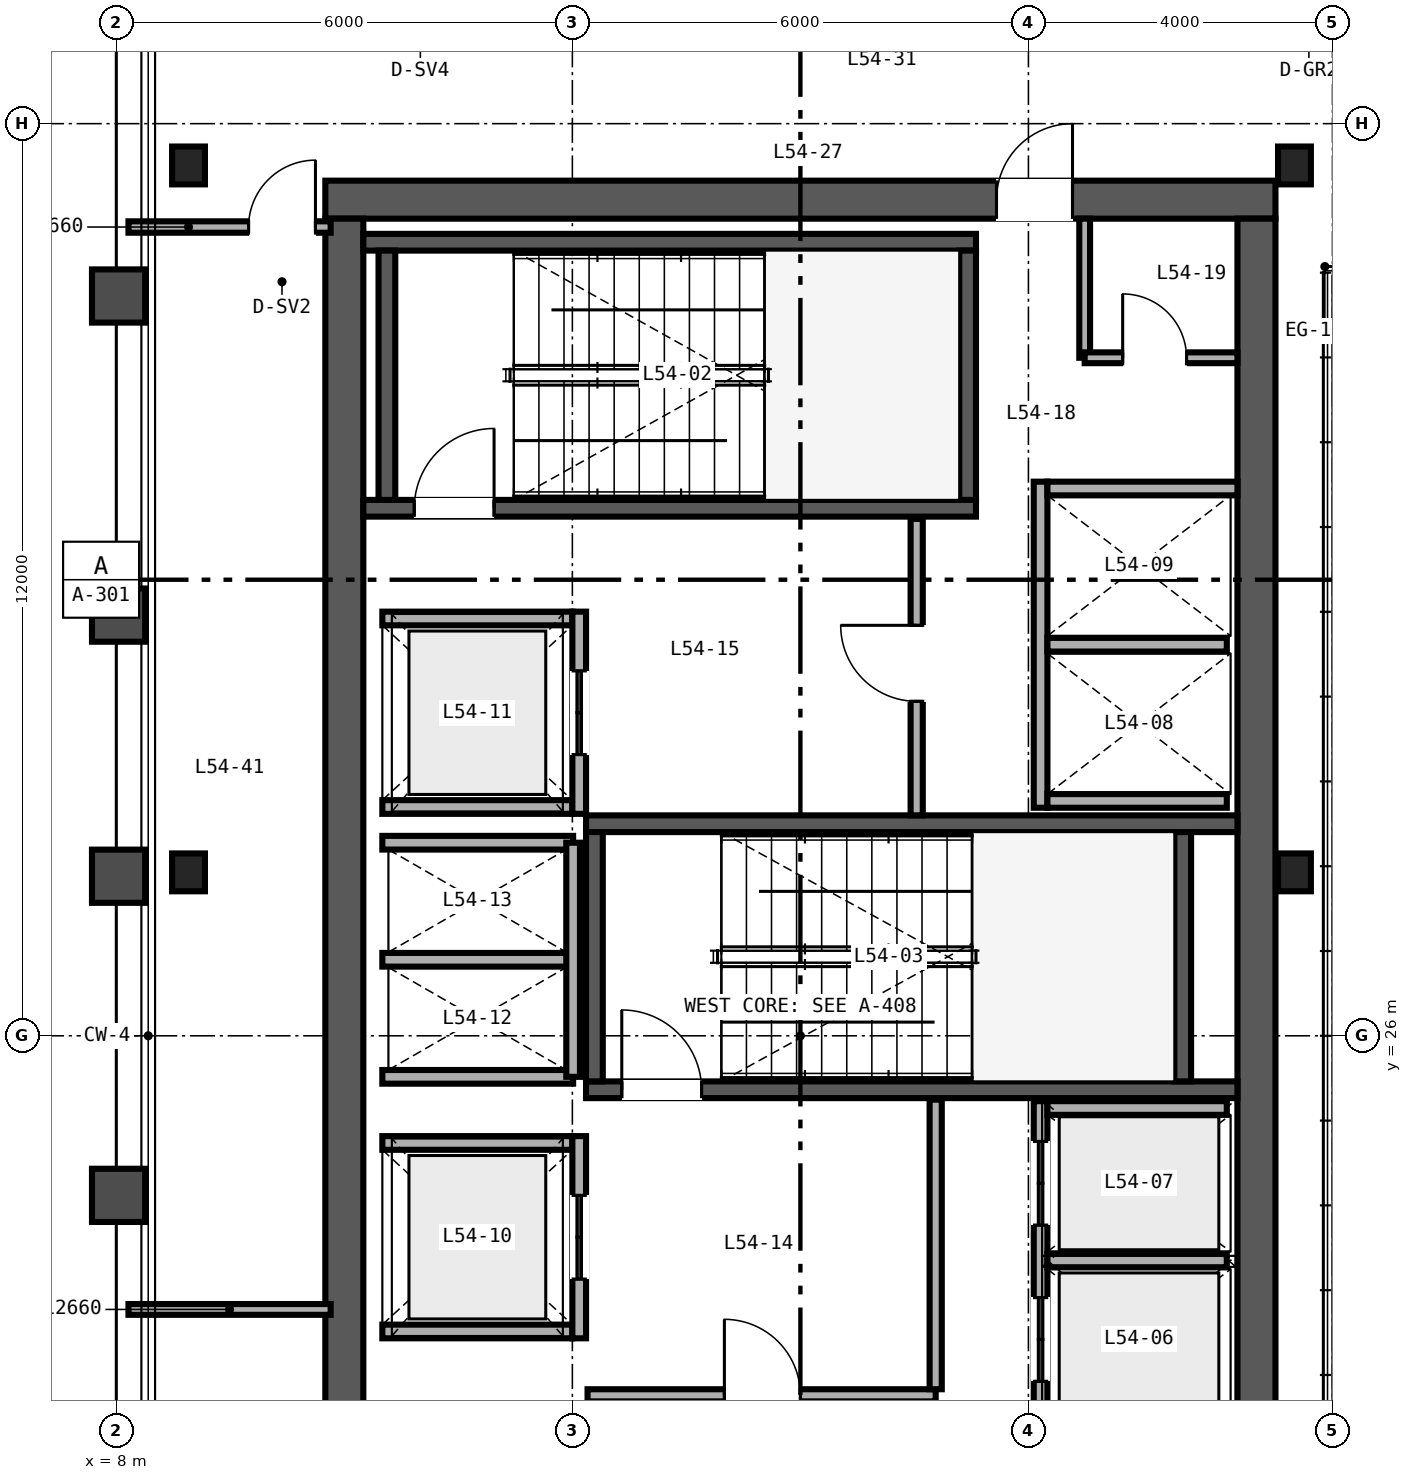
"""IFC4 building model, lengths in metres.
Left out: names, types, materials, properties, quantities, classifications, styles, units other than length and angle.
Written with IfcOpenShell. Run it as: python <this file> out.ifc"""

import sys

from ifc_helpers import new_model, si_unit, direction, frame, frame_2d, origin, origin_2d, place, context, subcontext, project, spatial, rectangle, i_section, extrude, source, transform, mapped, element, fill, save


model = new_model("IFC4")
c1 = context("Model", 3, precision=1e-05, world=origin(), true_north=direction((0.0, 1.0)))
c2 = subcontext(c1, "Body", "Model", "MODEL_VIEW")
j1 = project(units=[si_unit("LENGTHUNIT", "METRE"), si_unit("PLANEANGLEUNIT", "RADIAN")], contexts=[c1])
p1 = place(None, origin())
s1 = spatial("IfcSite", under=j1, at=p1, CompositionType="ELEMENT")
p2 = place(p1, origin())
s2 = spatial("IfcBuilding", under=s1, at=p2, CompositionType="ELEMENT")
p3 = place(p2, frame((0.0, 0.0, 213.6)))
s3 = spatial("IfcBuildingStorey", under=s2, at=p3, CompositionType="ELEMENT", Elevation=213.6)
p4 = place(p3, frame((10.75, 37.0, 0.0), z_axis=(0.0, 0.0, 1.0), x_axis=(1.0, 0.0, 0.0)))
e1 = element("IfcWall", 1, at=p4, inside=s3, PredefinedType="SHEAR", context=c2, shape_type="SweptSolid", body=[
    extrude(rectangle(XDim=12.5, YDim=0.5, at=frame_2d((6.25, 0.0))), origin(), (0.0, 0.0, 1.0), 3.37),
])
p5 = place(p4, frame((8.83, 0.0, 0.0)))
e2 = element("IfcOpeningElement", 2, at=p5, cuts=e1, PredefinedType="OPENING", context=c2, shape_type="SweptSolid", body=[
    extrude(rectangle(XDim=1.0, YDim=2.15, at=frame_2d((0.5, 1.075))), frame((0.0, 0.26, 0.0), z_axis=(0.0, -1.0, 0.0), x_axis=(1.0, 0.0, 0.0)), (0.0, 0.0, 1.0), 0.52),
])
for number, where, z_axis, x_axis in (
    (3, (11.0, 15.25, 0.0), (0.0, 0.0, 1.0), (0.0, 1.0, 0.0)),
    (4, (23.0, 15.25, 0.0), (0.0, 0.0, 1.0), (0.0, 1.0, 0.0)),
):
    element("IfcWall", number, at=place(p3, frame(where, z_axis=z_axis, x_axis=x_axis)), inside=s3, PredefinedType="SHEAR", context=c2, shape_type="SweptSolid", body=[
        extrude(rectangle(XDim=21.5, YDim=0.5, at=frame_2d((10.75, 0.0))), origin(), (0.0, 0.0, 1.0), 3.37),
    ])
p6 = place(p3, frame((11.25, 32.94, 0.0), z_axis=(0.0, 0.0, 1.0), x_axis=(1.0, 0.0, 0.0)))
e5 = element("IfcWall", 5, at=p6, inside=s3, PredefinedType="SHEAR", context=c2, shape_type="SweptSolid", body=[
    extrude(rectangle(XDim=8.06, YDim=0.22, at=frame_2d((4.03, 0.0))), origin(), (0.0, 0.0, 1.0), 3.4),
])
p7 = place(p6, frame((0.67, 0.0, 0.0)))
e6 = element("IfcOpeningElement", 6, at=p7, cuts=e5, PredefinedType="OPENING", context=c2, shape_type="SweptSolid", body=[
    extrude(rectangle(XDim=1.05, YDim=2.15, at=frame_2d((0.525, 1.075))), frame((0.0, 0.12, 0.0), z_axis=(0.0, -1.0, 0.0), x_axis=(1.0, 0.0, 0.0)), (0.0, 0.0, 1.0), 0.24),
])
p8 = place(p3, frame((11.25, 36.44, 0.0), z_axis=(0.0, 0.0, 1.0), x_axis=(1.0, 0.0, 0.0)))
e7 = element("IfcWall", 7, at=p8, inside=s3, PredefinedType="SHEAR", context=c2, shape_type="SweptSolid", body=[
    extrude(rectangle(XDim=8.06, YDim=0.22, at=frame_2d((4.03, 0.0))), origin(), (0.0, 0.0, 1.0), 3.4),
])
for number, where, z_axis, x_axis in (
    (8, (11.56, 33.05, 0.0), (0.0, 0.0, 1.0), (0.0, 1.0, 0.0)),
    (9, (19.2, 33.05, 0.0), (0.0, 0.0, 1.0), (0.0, 1.0, 0.0)),
):
    element("IfcWall", number, at=place(p3, frame(where, z_axis=z_axis, x_axis=x_axis)), inside=s3, PredefinedType="SHEAR", context=c2, shape_type="SweptSolid", body=[
        extrude(rectangle(XDim=3.28, YDim=0.22, at=frame_2d((1.64, 0.0))), origin(), (0.0, 0.0, 1.0), 3.4),
    ])
p9 = place(p3, frame((14.18, 25.29, 0.0), z_axis=(0.0, 0.0, 1.0), x_axis=(1.0, 0.0, 0.0)))
e10 = element("IfcWall", 10, at=p9, inside=s3, PredefinedType="SHEAR", context=c2, shape_type="SweptSolid", body=[
    extrude(rectangle(XDim=8.57, YDim=0.22, at=frame_2d((4.285, 0.0))), origin(), (0.0, 0.0, 1.0), 3.4),
])
p10 = place(p9, frame((0.47, 0.0, 0.0)))
e11 = element("IfcOpeningElement", 11, at=p10, cuts=e10, PredefinedType="OPENING", context=c2, shape_type="SweptSolid", body=[
    extrude(rectangle(XDim=1.05, YDim=2.15, at=frame_2d((0.525, 1.075))), frame((0.0, 0.12, 0.0), z_axis=(0.0, -1.0, 0.0), x_axis=(1.0, 0.0, 0.0)), (0.0, 0.0, 1.0), 0.24),
])
p11 = place(p3, frame((14.18, 28.79, 0.0), z_axis=(0.0, 0.0, 1.0), x_axis=(1.0, 0.0, 0.0)))
e12 = element("IfcWall", 12, at=p11, inside=s3, PredefinedType="SHEAR", context=c2, shape_type="SweptSolid", body=[
    extrude(rectangle(XDim=8.57, YDim=0.22, at=frame_2d((4.285, 0.0))), origin(), (0.0, 0.0, 1.0), 3.4),
])
for number, where, z_axis, x_axis in (
    (13, (14.29, 25.4, 0.0), (0.0, 0.0, 1.0), (0.0, 1.0, 0.0)),
    (14, (22.03, 25.4, 0.0), (0.0, 0.0, 1.0), (0.0, 1.0, 0.0)),
):
    element("IfcWall", number, at=place(p3, frame(where, z_axis=z_axis, x_axis=x_axis)), inside=s3, PredefinedType="SHEAR", context=c2, shape_type="SweptSolid", body=[
        extrude(rectangle(XDim=3.28, YDim=0.22, at=frame_2d((1.64, 0.0))), origin(), (0.0, 0.0, 1.0), 3.4),
    ])
m1 = source(origin(), c2, "Body", "SweptSolid", [
    extrude(i_section(OverallWidth=0.432, OverallDepth=0.498, WebThickness=0.056, FlangeThickness=0.089, FilletRadius=0.025, at=origin_2d()), origin(), (0.0, 0.0, 1.0), 3.37),
])
for number, where, z_axis, x_axis in (
    (15, (8.95, 28.15, 0.0), (0.0, 0.0, 1.0), (1.0, 0.0, 0.0)),
    (16, (23.5, 28.15, 0.0), (0.0, 0.0, 1.0), (1.0, 0.0, 0.0)),
    (17, (8.95, 37.45, 0.0), (0.0, 0.0, 1.0), (1.0, 0.0, 0.0)),
    (18, (23.5, 37.45, 0.0), (0.0, 0.0, 1.0), (1.0, 0.0, 0.0)),
):
    element("IfcColumn", number, at=place(p3, frame(where, z_axis=z_axis, x_axis=x_axis)), inside=s3, PredefinedType="COLUMN", context=c2, shape_type="MappedRepresentation", body=[
        mapped(m1, transform((0.0, 0.0, 0.0), scale=1.0)),
    ])
p12 = place(p3, frame((20.16, 18.82, 0.0), z_axis=(0.0, 0.0, 1.0), x_axis=(0.0, 1.0, 0.0)))
e19 = element("IfcWall", 19, at=p12, inside=s3, PredefinedType="SOLIDWALL", context=c2, shape_type="SweptSolid", body=[
    extrude(rectangle(XDim=6.32, YDim=0.18, at=frame_2d((3.16, 0.0))), origin(), (0.0, 0.0, 1.0), 2.47),
])
p13 = place(p12, frame((0.555, 0.0, 0.0)))
e20 = element("IfcOpeningElement", 20, at=p13, cuts=e19, PredefinedType="OPENING", context=c2, shape_type="SweptSolid", body=[
    extrude(rectangle(XDim=1.1, YDim=2.2, at=frame_2d((0.55, 1.1))), frame((0.0, 0.1, 0.0), z_axis=(0.0, -1.0, 0.0), x_axis=(1.0, 0.0, 0.0)), (0.0, 0.0, 1.0), 0.2),
])
p14 = place(p12, frame((2.635, 0.0, 0.0)))
e21 = element("IfcOpeningElement", 21, at=p14, cuts=e19, PredefinedType="OPENING", context=c2, shape_type="SweptSolid", body=[
    extrude(rectangle(XDim=1.1, YDim=2.2, at=frame_2d((0.55, 1.1))), frame((0.0, 0.1, 0.0), z_axis=(0.0, -1.0, 0.0), x_axis=(1.0, 0.0, 0.0)), (0.0, 0.0, 1.0), 0.2),
])
p15 = place(p12, frame((4.69, 0.0, 0.0)))
e22 = element("IfcOpeningElement", 22, at=p15, cuts=e19, PredefinedType="OPENING", context=c2, shape_type="SweptSolid", body=[
    extrude(rectangle(XDim=1.1, YDim=2.2, at=frame_2d((0.55, 1.1))), frame((0.0, 0.1, 0.0), z_axis=(0.0, -1.0, 0.0), x_axis=(1.0, 0.0, 0.0)), (0.0, 0.0, 1.0), 0.2),
])
for number, where, z_axis, x_axis in (
    (23, (20.25, 25.05, 0.0), (0.0, 0.0, 1.0), (1.0, 0.0, 0.0)),
    (24, (20.25, 23.045, 0.0), (0.0, 0.0, 1.0), (1.0, 0.0, 0.0)),
):
    element("IfcWall", number, at=place(p3, frame(where, z_axis=z_axis, x_axis=x_axis)), inside=s3, PredefinedType="SOLIDWALL", context=c2, shape_type="SweptSolid", body=[
        extrude(rectangle(XDim=2.36, YDim=0.18, at=frame_2d((1.18, 0.0))), origin(), (0.0, 0.0, 1.0), 3.37),
    ])
p16 = place(p3, frame((20.16, 29.0, 0.0), z_axis=(0.0, 0.0, 1.0), x_axis=(0.0, 1.0, 0.0)))
e25 = element("IfcWall", 25, at=p16, inside=s3, PredefinedType="SOLIDWALL", context=c2, shape_type="SweptSolid", body=[
    extrude(rectangle(XDim=4.29, YDim=0.18, at=frame_2d((2.145, 0.0))), origin(), (0.0, 0.0, 1.0), 3.37),
])
p17 = place(p3, frame((20.25, 29.09, 0.0), z_axis=(0.0, 0.0, 1.0), x_axis=(1.0, 0.0, 0.0)))
e26 = element("IfcWall", 26, at=p17, inside=s3, PredefinedType="SOLIDWALL", context=c2, shape_type="SweptSolid", body=[
    extrude(rectangle(XDim=2.36, YDim=0.18, at=frame_2d((1.18, 0.0))), origin(), (0.0, 0.0, 1.0), 3.37),
])
p18 = place(p3, frame((20.25, 33.2, 0.0), z_axis=(0.0, 0.0, 1.0), x_axis=(1.0, 0.0, 0.0)))
e27 = element("IfcWall", 27, at=p18, inside=s3, PredefinedType="SOLIDWALL", context=c2, shape_type="SweptSolid", body=[
    extrude(rectangle(XDim=2.5, YDim=0.18, at=frame_2d((1.25, 0.0))), origin(), (0.0, 0.0, 1.0), 3.37),
])
p19 = place(p3, frame((20.25, 31.145, 0.0), z_axis=(0.0, 0.0, 1.0), x_axis=(1.0, 0.0, 0.0)))
e28 = element("IfcWall", 28, at=p19, inside=s3, PredefinedType="SOLIDWALL", context=c2, shape_type="SweptSolid", body=[
    extrude(rectangle(XDim=2.36, YDim=0.18, at=frame_2d((1.18, 0.0))), origin(), (0.0, 0.0, 1.0), 3.37),
])
for number, where, z_axis, x_axis in (
    (29, (11.5, 22.11, 0.0), (0.0, 0.0, 1.0), (1.0, 0.0, 0.0)),
    (30, (11.5, 24.59, 0.0), (0.0, 0.0, 1.0), (1.0, 0.0, 0.0)),
):
    element("IfcWall", number, at=place(p3, frame(where, z_axis=z_axis, x_axis=x_axis)), inside=s3, PredefinedType="SOLIDWALL", context=c2, shape_type="SweptSolid", body=[
        extrude(rectangle(XDim=2.5, YDim=0.18, at=frame_2d((1.25, 0.0))), origin(), (0.0, 0.0, 1.0), 3.37),
    ])
p20 = place(p3, frame((14.09, 22.02, 0.0), z_axis=(0.0, 0.0, 1.0), x_axis=(0.0, 1.0, 0.0)))
e31 = element("IfcWall", 31, at=p20, inside=s3, PredefinedType="SOLIDWALL", context=c2, shape_type="SweptSolid", body=[
    extrude(rectangle(XDim=2.66, YDim=0.18, at=frame_2d((1.33, 0.0))), origin(), (0.0, 0.0, 1.0), 3.37),
])
p21 = place(p20, frame((0.78, 0.0, 0.0)))
e32 = element("IfcOpeningElement", 32, at=p21, cuts=e31, PredefinedType="OPENING", context=c2, shape_type="SweptSolid", body=[
    extrude(rectangle(XDim=1.1, YDim=2.2, at=frame_2d((0.55, 1.1))), frame((0.0, 0.1, 0.0), z_axis=(0.0, -1.0, 0.0), x_axis=(1.0, 0.0, 0.0)), (0.0, 0.0, 1.0), 0.2),
])
for number, where, z_axis, x_axis in (
    (33, (11.5, 29.01, 0.0), (0.0, 0.0, 1.0), (1.0, 0.0, 0.0)),
    (34, (11.5, 31.49, 0.0), (0.0, 0.0, 1.0), (1.0, 0.0, 0.0)),
):
    element("IfcWall", number, at=place(p3, frame(where, z_axis=z_axis, x_axis=x_axis)), inside=s3, PredefinedType="SOLIDWALL", context=c2, shape_type="SweptSolid", body=[
        extrude(rectangle(XDim=2.5, YDim=0.18, at=frame_2d((1.25, 0.0))), origin(), (0.0, 0.0, 1.0), 3.37),
    ])
p22 = place(p3, frame((14.09, 28.92, 0.0), z_axis=(0.0, 0.0, 1.0), x_axis=(0.0, 1.0, 0.0)))
e35 = element("IfcWall", 35, at=p22, inside=s3, PredefinedType="SOLIDWALL", context=c2, shape_type="SweptSolid", body=[
    extrude(rectangle(XDim=2.66, YDim=0.18, at=frame_2d((1.33, 0.0))), origin(), (0.0, 0.0, 1.0), 3.37),
])
p23 = place(p22, frame((0.78, 0.0, 0.0)))
e36 = element("IfcOpeningElement", 36, at=p23, cuts=e35, PredefinedType="OPENING", context=c2, shape_type="SweptSolid", body=[
    extrude(rectangle(XDim=1.1, YDim=2.2, at=frame_2d((0.55, 1.1))), frame((0.0, 0.1, 0.0), z_axis=(0.0, -1.0, 0.0), x_axis=(1.0, 0.0, 0.0)), (0.0, 0.0, 1.0), 0.2),
])
for number, where, z_axis, x_axis in (
    (37, (11.5, 25.46, 0.0), (0.0, 0.0, 1.0), (1.0, 0.0, 0.0)),
    (38, (11.5, 27.0, 0.0), (0.0, 0.0, 1.0), (1.0, 0.0, 0.0)),
    (39, (11.5, 28.54, 0.0), (0.0, 0.0, 1.0), (1.0, 0.0, 0.0)),
):
    element("IfcWall", number, at=place(p3, frame(where, z_axis=z_axis, x_axis=x_axis)), inside=s3, PredefinedType="SOLIDWALL", context=c2, shape_type="SweptSolid", body=[
        extrude(rectangle(XDim=2.51, YDim=0.18, at=frame_2d((1.255, 0.0))), origin(), (0.0, 0.0, 1.0), 3.37),
    ])
p24 = place(p3, frame((14.01, 25.46, 0.0), z_axis=(0.0, 0.0, 1.0), x_axis=(0.0, 1.0, 0.0)))
e40 = element("IfcWall", 40, at=p24, inside=s3, PredefinedType="SOLIDWALL", context=c2, shape_type="SweptSolid", body=[
    extrude(rectangle(XDim=3.08, YDim=0.18, at=frame_2d((1.54, 0.0))), origin(), (0.0, 0.0, 1.0), 3.37),
])
p25 = place(p3, frame((14.2, 21.27, 0.0), z_axis=(0.0, 0.0, 1.0), x_axis=(1.0, 0.0, 0.0)))
e41 = element("IfcWall", 41, at=p25, inside=s3, PredefinedType="PARTITIONING", context=c2, shape_type="SweptSolid", body=[
    extrude(rectangle(XDim=4.58, YDim=0.16, at=frame_2d((2.29, 0.0))), origin(), (0.0, 0.0, 1.0), 3.37),
])
p26 = place(p25, frame((1.8, 0.0, 0.0)))
e42 = element("IfcOpeningElement", 42, at=p26, cuts=e41, PredefinedType="OPENING", context=c2, shape_type="SweptSolid", body=[
    extrude(rectangle(XDim=1.0, YDim=2.15, at=frame_2d((0.5, 1.075))), frame((0.0, 0.09, 0.0), z_axis=(0.0, -1.0, 0.0), x_axis=(1.0, 0.0, 0.0)), (0.0, 0.0, 1.0), 0.18),
])
p27 = place(p3, frame((18.78, 21.35, 0.0), z_axis=(0.0, 0.0, 1.0), x_axis=(0.0, 1.0, 0.0)))
e43 = element("IfcWall", 43, at=p27, inside=s3, PredefinedType="PARTITIONING", context=c2, shape_type="SweptSolid", body=[
    extrude(rectangle(XDim=3.81, YDim=0.16, at=frame_2d((1.905, 0.0))), origin(), (0.0, 0.0, 1.0), 3.37),
])
p28 = place(p3, frame((18.53, 28.9, 0.0), z_axis=(0.0, 0.0, 1.0), x_axis=(0.0, 1.0, 0.0)))
e44 = element("IfcWall", 44, at=p28, inside=s3, PredefinedType="PARTITIONING", context=c2, shape_type="SweptSolid", body=[
    extrude(rectangle(XDim=3.9, YDim=0.16, at=frame_2d((1.95, 0.0))), origin(), (0.0, 0.0, 1.0), 3.37),
])
p29 = place(p28, frame((1.5, 0.0, 0.0)))
e45 = element("IfcOpeningElement", 45, at=p29, cuts=e44, PredefinedType="OPENING", context=c2, shape_type="SweptSolid", body=[
    extrude(rectangle(XDim=1.0, YDim=2.15, at=frame_2d((0.5, 1.075))), frame((0.0, 0.09, 0.0), z_axis=(0.0, -1.0, 0.0), x_axis=(1.0, 0.0, 0.0)), (0.0, 0.0, 1.0), 0.18),
])
p30 = place(p3, frame((20.74, 34.92, 0.0), z_axis=(0.0, 0.0, 1.0), x_axis=(0.0, 1.0, 0.0)))
e46 = element("IfcWall", 46, at=p30, inside=s3, PredefinedType="PARTITIONING", context=c2, shape_type="SweptSolid", body=[
    extrude(rectangle(XDim=1.83, YDim=0.142, at=frame_2d((0.915, 0.0))), origin(), (0.0, 0.0, 1.0), 3.37),
])
p31 = place(p3, frame((20.74, 34.92, 0.0), z_axis=(0.0, 0.0, 1.0), x_axis=(1.0, 0.0, 0.0)))
e47 = element("IfcWall", 47, at=p31, inside=s3, PredefinedType="PARTITIONING", context=c2, shape_type="SweptSolid", body=[
    extrude(rectangle(XDim=2.01, YDim=0.142, at=frame_2d((1.005, 0.0))), origin(), (0.0, 0.0, 1.0), 3.37),
])
p32 = place(p31, frame((0.5, 0.0, 0.0)))
e48 = element("IfcOpeningElement", 48, at=p32, cuts=e47, PredefinedType="OPENING", context=c2, shape_type="SweptSolid", body=[
    extrude(rectangle(XDim=0.84, YDim=2.1, at=frame_2d((0.42, 1.05))), frame((0.0, 0.081, 0.0), z_axis=(0.0, -1.0, 0.0), x_axis=(1.0, 0.0, 0.0)), (0.0, 0.0, 1.0), 0.162),
])
p33 = place(p3, frame((8.16, 36.64, 0.0), z_axis=(0.0, 0.0, 1.0), x_axis=(1.0, 0.0, 0.0)))
e49 = element("IfcWall", 49, at=p33, inside=s3, PredefinedType="PARTITIONING", context=c2, shape_type="SweptSolid", body=[
    extrude(rectangle(XDim=2.66, YDim=0.15, at=frame_2d((1.33, 0.0))), origin(), (0.0, 0.0, 1.0), 2.753),
])
p34 = place(p33, frame((1.58, 0.0, 0.0)))
e50 = element("IfcOpeningElement", 50, at=p34, cuts=e49, PredefinedType="OPENING", context=c2, shape_type="SweptSolid", body=[
    extrude(rectangle(XDim=0.88, YDim=2.15, at=frame_2d((0.44, 1.075))), frame((0.0, 0.085, 0.0), z_axis=(0.0, -1.0, 0.0), x_axis=(1.0, 0.0, 0.0)), (0.0, 0.0, 1.0), 0.17),
])
p35 = place(p3, frame((8.16, 22.4, 0.0), z_axis=(0.0, 0.0, 1.0), x_axis=(1.0, 0.0, 0.0)))
e51 = element("IfcWall", 51, at=p35, inside=s3, PredefinedType="PARTITIONING", context=c2, shape_type="SweptSolid", body=[
    extrude(rectangle(XDim=2.66, YDim=0.142, at=frame_2d((1.33, 0.0))), origin(), (0.0, 0.0, 1.0), 2.591),
])
m2 = source(origin(), c2, "Body", "SweptSolid", [
    extrude(rectangle(XDim=1.05, YDim=2.15, at=frame_2d((0.525, 1.075))), frame((0.0, 0.025, 0.0), z_axis=(0.0, -1.0, 0.0), x_axis=(1.0, 0.0, 0.0)), (0.0, 0.0, 1.0), 0.05),
])
p36 = place(p7, origin())
e52 = element("IfcDoor", 52, at=p36, inside=s3, OperationType="SINGLE_SWING_RIGHT", PredefinedType="DOOR", context=c2, shape_type="MappedRepresentation", body=[
    mapped(m2, transform((0.0, 0.0, 0.0), scale=1.0)),
])
fill(e6, e52)
p37 = place(p10, origin())
e53 = element("IfcDoor", 53, at=p37, inside=s3, OperationType="SINGLE_SWING_LEFT", PredefinedType="DOOR", context=c2, shape_type="MappedRepresentation", body=[
    mapped(m2, transform((0.0, 0.0, 0.0), scale=1.0)),
])
fill(e11, e53)
m3 = source(origin(), c2, "Body", "SweptSolid", [
    extrude(rectangle(XDim=1.1, YDim=2.2, at=frame_2d((0.55, 1.1))), frame((0.0, 0.025, 0.0), z_axis=(0.0, -1.0, 0.0), x_axis=(1.0, 0.0, 0.0)), (0.0, 0.0, 1.0), 0.05),
])
p38 = place(p14, origin())
e54 = element("IfcDoor", 54, at=p38, inside=s3, OperationType="DOUBLE_DOOR_SLIDING", PredefinedType="DOOR", context=c2, shape_type="MappedRepresentation", body=[
    mapped(m3, transform((0.0, 0.0, 0.0), scale=1.0)),
])
fill(e21, e54)
p39 = place(p15, origin())
e55 = element("IfcDoor", 55, at=p39, inside=s3, OperationType="DOUBLE_DOOR_SLIDING", PredefinedType="DOOR", context=c2, shape_type="MappedRepresentation", body=[
    mapped(m3, transform((0.0, 0.0, 0.0), scale=1.0)),
])
fill(e22, e55)
p40 = place(p21, origin())
e56 = element("IfcDoor", 56, at=p40, inside=s3, OperationType="DOUBLE_DOOR_SLIDING", PredefinedType="DOOR", context=c2, shape_type="MappedRepresentation", body=[
    mapped(m3, transform((0.0, 0.0, 0.0), scale=1.0)),
])
fill(e32, e56)
p41 = place(p23, origin())
e57 = element("IfcDoor", 57, at=p41, inside=s3, OperationType="DOUBLE_DOOR_SLIDING", PredefinedType="DOOR", context=c2, shape_type="MappedRepresentation", body=[
    mapped(m3, transform((0.0, 0.0, 0.0), scale=1.0)),
])
fill(e36, e57)
m4 = source(origin(), c2, "Body", "SweptSolid", [
    extrude(rectangle(XDim=1.0, YDim=2.15, at=frame_2d((0.5, 1.075))), frame((0.0, 0.025, 0.0), z_axis=(0.0, -1.0, 0.0), x_axis=(1.0, 0.0, 0.0)), (0.0, 0.0, 1.0), 0.05),
])
p42 = place(p26, origin())
e58 = element("IfcDoor", 58, at=p42, inside=s3, OperationType="SINGLE_SWING_LEFT", PredefinedType="DOOR", context=c2, shape_type="MappedRepresentation", body=[
    mapped(m4, transform((0.0, 0.0, 0.0), scale=1.0)),
])
fill(e42, e58)
p43 = place(p29, origin())
e59 = element("IfcDoor", 59, at=p43, inside=s3, OperationType="SINGLE_SWING_RIGHT", PredefinedType="DOOR", context=c2, shape_type="MappedRepresentation", body=[
    mapped(m4, transform((0.0, 0.0, 0.0), scale=1.0)),
])
fill(e45, e59)
m5 = source(origin(), c2, "Body", "SweptSolid", [
    extrude(rectangle(XDim=0.84, YDim=2.1, at=frame_2d((0.42, 1.05))), frame((0.0, 0.025, 0.0), z_axis=(0.0, -1.0, 0.0), x_axis=(1.0, 0.0, 0.0)), (0.0, 0.0, 1.0), 0.05),
])
p44 = place(p32, origin())
e60 = element("IfcDoor", 60, at=p44, inside=s3, OperationType="SINGLE_SWING_LEFT", PredefinedType="DOOR", context=c2, shape_type="MappedRepresentation", body=[
    mapped(m5, transform((0.0, 0.0, 0.0), scale=1.0)),
])
fill(e48, e60)
p45 = place(p5, origin())
e61 = element("IfcDoor", 61, at=p45, inside=s3, OperationType="SINGLE_SWING_RIGHT", PredefinedType="DOOR", context=c2, shape_type="MappedRepresentation", body=[
    mapped(m4, transform((0.0, 0.0, 0.0), scale=1.0)),
])
fill(e2, e61)
m6 = source(origin(), c2, "Body", "SweptSolid", [
    extrude(rectangle(XDim=0.88, YDim=2.15, at=frame_2d((0.44, 1.075))), frame((0.0, 0.025, 0.0), z_axis=(0.0, -1.0, 0.0), x_axis=(1.0, 0.0, 0.0)), (0.0, 0.0, 1.0), 0.05),
])
p46 = place(p34, origin())
e62 = element("IfcDoor", 62, at=p46, inside=s3, OperationType="SINGLE_SWING_RIGHT", PredefinedType="DOOR", context=c2, shape_type="MappedRepresentation", body=[
    mapped(m6, transform((0.0, 0.0, 0.0), scale=1.0)),
])
fill(e50, e62)
save(model, sys.argv[1])
